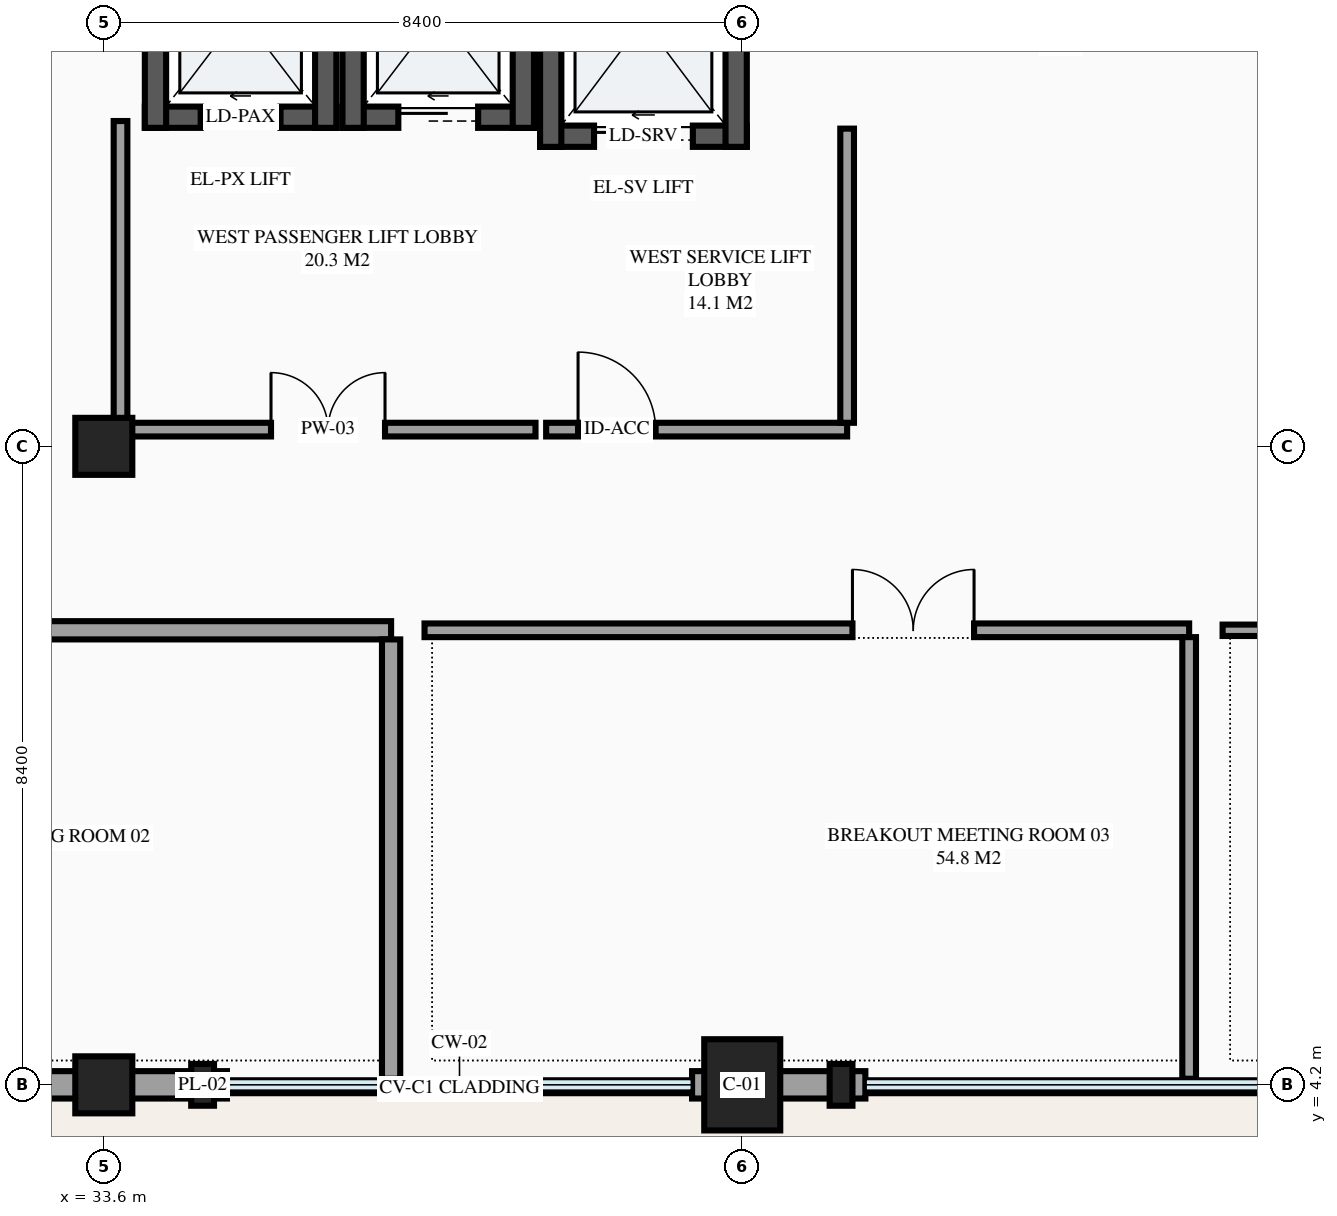
"""IFC4 building model, lengths in metres.
Left out: names, types, materials, properties, quantities, classifications, styles, units other than length and angle.
Written with IfcOpenShell. Run it as: python <this file> out.ifc"""

import sys

from ifc_helpers import new_model, si_unit, direction, frame, frame_2d, origin, origin_2d, place, context, subcontext, project, spatial, rectangle, extrude, element, fill, save


model = new_model("IFC4")
c1 = context("Model", 3, precision=1e-05, world=origin(), true_north=direction((0.0, 1.0)))
c2 = subcontext(c1, "Body", "Model", "MODEL_VIEW")
j1 = project(units=[si_unit("LENGTHUNIT", "METRE"), si_unit("PLANEANGLEUNIT", "RADIAN")], contexts=[c1])
p1 = place(None, origin())
s1 = spatial("IfcSite", under=j1, at=p1, CompositionType="ELEMENT")
p2 = place(p1, origin())
s2 = spatial("IfcBuilding", under=s1, at=p2, CompositionType="ELEMENT")
p3 = place(p2, frame((0.0, 0.0, 5.4)))
s3 = spatial("IfcBuildingStorey", under=s2, at=p3, CompositionType="ELEMENT", Elevation=5.4)
for number, where, z_axis, x_axis in (
    (1, (33.6, 4.2, 0.0), (0.0, 0.0, 1.0), (1.0, 0.0, 0.0)),
    (2, (33.6, 12.6, 0.0), (0.0, 0.0, 1.0), (1.0, 0.0, 0.0)),
):
    element("IfcColumn", number, at=place(p3, frame(where, z_axis=z_axis, x_axis=x_axis)), inside=s3, PredefinedType="COLUMN", context=c2, shape_type="SweptSolid", body=[
        extrude(rectangle(XDim=0.75, YDim=0.75, at=origin_2d()), origin(), (0.0, 0.0, 1.0), 4.5),
    ])
p4 = place(p3, frame((42.0, 4.2, 0.0), z_axis=(0.0, 0.0, 1.0), x_axis=(1.0, 0.0, 0.0)))
e3 = element("IfcColumn", 3, at=p4, inside=s3, PredefinedType="COLUMN", context=c2, shape_type="SweptSolid", body=[
    extrude(rectangle(XDim=1.0, YDim=1.2, at=origin_2d()), origin(), (0.0, 0.0, 1.0), 4.5),
])
for number, where, z_axis, x_axis in (
    (4, (34.9, 4.2, 0.0), (0.0, 0.0, 1.0), (1.0, 0.0, 0.0)),
    (5, (43.3, 4.2, 0.0), (0.0, 0.0, 1.0), (1.0, 0.0, 0.0)),
):
    element("IfcColumn", number, at=place(p3, frame(where, z_axis=z_axis, x_axis=x_axis)), inside=s3, PredefinedType="PILASTER", context=c2, shape_type="SweptSolid", body=[
        extrude(rectangle(XDim=0.3, YDim=0.55, at=origin_2d()), origin(), (0.0, 0.0, 1.0), 4.5),
    ])
p5 = place(p3, frame((25.2, 4.2, 0.0), z_axis=(0.0, 0.0, 1.0), x_axis=(1.0, 0.0, 0.0)))
e6 = element("IfcWall", 6, at=p5, inside=s3, PredefinedType="STANDARD", context=c2, shape_type="SweptSolid", body=[
    extrude(rectangle(XDim=8.4, YDim=0.36, at=frame_2d((4.2, 0.0))), origin(), (0.0, 0.0, 1.0), 3.39),
])
p6 = place(p5, frame((3.3, 0.0, 0.75)))
e7 = element("IfcOpeningElement", 7, at=p6, cuts=e6, PredefinedType="OPENING", context=c2, shape_type="SweptSolid", body=[
    extrude(rectangle(XDim=1.8, YDim=1.5, at=frame_2d((0.9, 0.75))), frame((0.0, 0.19, 0.0), z_axis=(0.0, -1.0, 0.0), x_axis=(1.0, 0.0, 0.0)), (0.0, 0.0, 1.0), 0.38),
])
p7 = place(p3, frame((33.6, 4.2, 0.0), z_axis=(0.0, 0.0, 1.0), x_axis=(1.0, 0.0, 0.0)))
e8 = element("IfcWall", 8, at=p7, inside=s3, PredefinedType="STANDARD", context=c2, shape_type="SweptSolid", body=[
    extrude(rectangle(XDim=1.62, YDim=0.36, at=frame_2d((0.81, 0.0))), origin(), (0.0, 0.0, 1.0), 3.74),
])
p8 = place(p3, frame((41.34, 4.2, 0.0), z_axis=(0.0, 0.0, 1.0), x_axis=(1.0, 0.0, 0.0)))
e9 = element("IfcWall", 9, at=p8, inside=s3, PredefinedType="STANDARD", context=c2, shape_type="SweptSolid", body=[
    extrude(rectangle(XDim=0.66, YDim=0.36, at=frame_2d((0.33, 0.0))), origin(), (0.0, 0.0, 1.0), 4.5),
])
p9 = place(p3, frame((42.0, 4.2, 0.0), z_axis=(0.0, 0.0, 1.0), x_axis=(1.0, 0.0, 0.0)))
e10 = element("IfcWall", 10, at=p9, inside=s3, PredefinedType="STANDARD", context=c2, shape_type="SweptSolid", body=[
    extrude(rectangle(XDim=1.62, YDim=0.36, at=frame_2d((0.81, 0.0))), origin(), (0.0, 0.0, 1.0), 3.637),
])
p10 = place(p3, frame((34.14, 16.93, 0.0), z_axis=(0.0, 0.0, 1.0), x_axis=(1.0, 0.0, 0.0)))
e11 = element("IfcWall", 11, at=p10, inside=s3, PredefinedType="SHEAR", context=c2, shape_type="SweptSolid", body=[
    extrude(rectangle(XDim=2.52, YDim=0.28, at=frame_2d((1.26, 0.0))), origin(), (0.0, 0.0, 1.0), 4.5),
])
p11 = place(p10, frame((0.735, 0.0, 0.0)))
e12 = element("IfcOpeningElement", 12, at=p11, cuts=e11, PredefinedType="OPENING", context=c2, shape_type="SweptSolid", body=[
    extrude(rectangle(XDim=1.05, YDim=2.2, at=frame_2d((0.525, 1.1))), frame((0.0, 0.15, 0.0), z_axis=(0.0, -1.0, 0.0), x_axis=(1.0, 0.0, 0.0)), (0.0, 0.0, 1.0), 0.3),
])
for number, where, z_axis, x_axis in (
    (13, (36.52, 16.79, 0.0), (0.0, 0.0, 1.0), (0.0, 1.0, 0.0)),
    (14, (34.28, 19.81, 0.0), (0.0, 0.0, 1.0), (0.0, -1.0, 0.0)),
):
    element("IfcWall", number, at=place(p3, frame(where, z_axis=z_axis, x_axis=x_axis)), inside=s3, PredefinedType="SHEAR", context=c2, shape_type="SweptSolid", body=[
        extrude(rectangle(XDim=3.02, YDim=0.28, at=frame_2d((1.51, 0.0))), origin(), (0.0, 0.0, 1.0), 4.5),
    ])
p12 = place(p3, frame((36.74, 16.93, 0.0), z_axis=(0.0, 0.0, 1.0), x_axis=(1.0, 0.0, 0.0)))
e15 = element("IfcWall", 15, at=p12, inside=s3, PredefinedType="SHEAR", context=c2, shape_type="SweptSolid", body=[
    extrude(rectangle(XDim=2.52, YDim=0.28, at=frame_2d((1.26, 0.0))), origin(), (0.0, 0.0, 1.0), 4.5),
])
p13 = place(p12, frame((0.735, 0.0, 0.0)))
e16 = element("IfcOpeningElement", 16, at=p13, cuts=e15, PredefinedType="OPENING", context=c2, shape_type="SweptSolid", body=[
    extrude(rectangle(XDim=1.05, YDim=2.2, at=frame_2d((0.525, 1.1))), frame((0.0, 0.15, 0.0), z_axis=(0.0, -1.0, 0.0), x_axis=(1.0, 0.0, 0.0)), (0.0, 0.0, 1.0), 0.3),
])
for number, where, z_axis, x_axis in (
    (17, (39.12, 16.79, 0.0), (0.0, 0.0, 1.0), (0.0, 1.0, 0.0)),
    (18, (36.88, 19.81, 0.0), (0.0, 0.0, 1.0), (0.0, -1.0, 0.0)),
):
    element("IfcWall", number, at=place(p3, frame(where, z_axis=z_axis, x_axis=x_axis)), inside=s3, PredefinedType="SHEAR", context=c2, shape_type="SweptSolid", body=[
        extrude(rectangle(XDim=3.02, YDim=0.28, at=frame_2d((1.51, 0.0))), origin(), (0.0, 0.0, 1.0), 4.5),
    ])
p14 = place(p3, frame((39.34, 16.68, 0.0), z_axis=(0.0, 0.0, 1.0), x_axis=(1.0, 0.0, 0.0)))
e19 = element("IfcWall", 19, at=p14, inside=s3, PredefinedType="SHEAR", context=c2, shape_type="SweptSolid", body=[
    extrude(rectangle(XDim=2.72, YDim=0.28, at=frame_2d((1.36, 0.0))), origin(), (0.0, 0.0, 1.0), 4.5),
])
p15 = place(p14, frame((0.71, 0.0, 0.0)))
e20 = element("IfcOpeningElement", 20, at=p15, cuts=e19, PredefinedType="OPENING", context=c2, shape_type="SweptSolid", body=[
    extrude(rectangle(XDim=1.3, YDim=2.25, at=frame_2d((0.65, 1.125))), frame((0.0, 0.15, 0.0), z_axis=(0.0, -1.0, 0.0), x_axis=(1.0, 0.0, 0.0)), (0.0, 0.0, 1.0), 0.3),
])
for number, where, z_axis, x_axis in (
    (21, (41.92, 16.54, 0.0), (0.0, 0.0, 1.0), (0.0, 1.0, 0.0)),
    (22, (39.48, 19.86, 0.0), (0.0, 0.0, 1.0), (0.0, -1.0, 0.0)),
):
    element("IfcWall", number, at=place(p3, frame(where, z_axis=z_axis, x_axis=x_axis)), inside=s3, PredefinedType="SHEAR", context=c2, shape_type="SweptSolid", body=[
        extrude(rectangle(XDim=3.32, YDim=0.28, at=frame_2d((1.66, 0.0))), origin(), (0.0, 0.0, 1.0), 4.5),
    ])
p16 = place(p3, frame((33.82, 12.82, 0.0), z_axis=(0.0, 0.0, 1.0), x_axis=(1.0, 0.0, 0.0)))
e23 = element("IfcWall", 23, at=p16, inside=s3, PredefinedType="PARTITIONING", context=c2, shape_type="SweptSolid", body=[
    extrude(rectangle(XDim=5.46, YDim=0.18, at=frame_2d((2.73, 0.0))), origin(), (0.0, 0.0, 1.0), 4.235),
])
p17 = place(p16, frame((1.98, 0.0, 0.0)))
e24 = element("IfcOpeningElement", 24, at=p17, cuts=e23, PredefinedType="OPENING", context=c2, shape_type="SweptSolid", body=[
    extrude(rectangle(XDim=1.5, YDim=2.15, at=frame_2d((0.75, 1.075))), frame((0.0, 0.1, 0.0), z_axis=(0.0, -1.0, 0.0), x_axis=(1.0, 0.0, 0.0)), (0.0, 0.0, 1.0), 0.2),
])
p18 = place(p3, frame((33.82, 12.91, 0.0), z_axis=(0.0, 0.0, 1.0), x_axis=(0.0, 1.0, 0.0)))
e25 = element("IfcWall", 25, at=p18, inside=s3, PredefinedType="PARTITIONING", context=c2, shape_type="SweptSolid", body=[
    extrude(rectangle(XDim=3.97, YDim=0.18, at=frame_2d((1.985, 0.0))), origin(), (0.0, 0.0, 1.0), 3.29),
])
p19 = place(p3, frame((39.42, 12.82, 0.0), z_axis=(0.0, 0.0, 1.0), x_axis=(1.0, 0.0, 0.0)))
e26 = element("IfcWall", 26, at=p19, inside=s3, PredefinedType="PARTITIONING", context=c2, shape_type="SweptSolid", body=[
    extrude(rectangle(XDim=3.96, YDim=0.18, at=frame_2d((1.98, 0.0))), origin(), (0.0, 0.0, 1.0), 4.235),
])
p20 = place(p19, frame((0.42, 0.0, 0.0)))
e27 = element("IfcOpeningElement", 27, at=p20, cuts=e26, PredefinedType="OPENING", context=c2, shape_type="SweptSolid", body=[
    extrude(rectangle(XDim=1.02, YDim=2.15, at=frame_2d((0.51, 1.075))), frame((0.0, 0.1, 0.0), z_axis=(0.0, -1.0, 0.0), x_axis=(1.0, 0.0, 0.0)), (0.0, 0.0, 1.0), 0.2),
])
p21 = place(p3, frame((43.38, 12.91, 0.0), z_axis=(0.0, 0.0, 1.0), x_axis=(0.0, 1.0, 0.0)))
e28 = element("IfcWall", 28, at=p21, inside=s3, PredefinedType="PARTITIONING", context=c2, shape_type="SweptSolid", body=[
    extrude(rectangle(XDim=3.87, YDim=0.18, at=frame_2d((1.935, 0.0))), origin(), (0.0, 0.0, 1.0), 4.235),
])
p22 = place(p3, frame((27.32, 10.18, 0.0), z_axis=(0.0, 0.0, 1.0), x_axis=(1.0, 0.0, 0.0)))
e29 = element("IfcWall", 29, at=p22, inside=s3, PredefinedType="PARTITIONING", context=c2, shape_type="SweptSolid", body=[
    extrude(rectangle(XDim=10.06, YDim=0.24, at=frame_2d((5.03, 0.0))), origin(), (0.0, 0.0, 1.0), 4.235),
])
p23 = place(p22, frame((3.18, 0.0, 0.0)))
e30 = element("IfcOpeningElement", 30, at=p23, cuts=e29, PredefinedType="OPENING", context=c2, shape_type="SweptSolid", body=[
    extrude(rectangle(XDim=1.6, YDim=2.25, at=frame_2d((0.8, 1.125))), frame((0.0, 0.13, 0.0), z_axis=(0.0, -1.0, 0.0), x_axis=(1.0, 0.0, 0.0)), (0.0, 0.0, 1.0), 0.26),
])
p24 = place(p3, frame((37.38, 4.28, 0.0), z_axis=(0.0, 0.0, 1.0), x_axis=(0.0, 1.0, 0.0)))
e31 = element("IfcWall", 31, at=p24, inside=s3, PredefinedType="PARTITIONING", context=c2, shape_type="SweptSolid", body=[
    extrude(rectangle(XDim=5.78, YDim=0.24, at=frame_2d((2.89, 0.0))), origin(), (0.0, 0.0, 1.0), 4.235),
])
p25 = place(p3, frame((37.82, 10.18, 0.0), z_axis=(0.0, 0.0, 1.0), x_axis=(1.0, 0.0, 0.0)))
e32 = element("IfcWall", 32, at=p25, inside=s3, PredefinedType="PARTITIONING", context=c2, shape_type="SweptSolid", body=[
    extrude(rectangle(XDim=10.06, YDim=0.18, at=frame_2d((5.03, 0.0))), origin(), (0.0, 0.0, 1.0), 4.235),
])
p26 = place(p25, frame((5.63, 0.0, 0.0)))
e33 = element("IfcOpeningElement", 33, at=p26, cuts=e32, PredefinedType="OPENING", context=c2, shape_type="SweptSolid", body=[
    extrude(rectangle(XDim=1.6, YDim=2.25, at=frame_2d((0.8, 1.125))), frame((0.0, 0.1, 0.0), z_axis=(0.0, -1.0, 0.0), x_axis=(1.0, 0.0, 0.0)), (0.0, 0.0, 1.0), 0.2),
])
p27 = place(p3, frame((47.88, 4.28, 0.0), z_axis=(0.0, 0.0, 1.0), x_axis=(0.0, 1.0, 0.0)))
e34 = element("IfcWall", 34, at=p27, inside=s3, PredefinedType="PARTITIONING", context=c2, shape_type="SweptSolid", body=[
    extrude(rectangle(XDim=5.81, YDim=0.18, at=frame_2d((2.905, 0.0))), origin(), (0.0, 0.0, 1.0), 4.235),
])
p28 = place(p3, frame((48.32, 10.18, 0.0), z_axis=(0.0, 0.0, 1.0), x_axis=(1.0, 0.0, 0.0)))
e35 = element("IfcWall", 35, at=p28, inside=s3, PredefinedType="PARTITIONING", context=c2, shape_type="SweptSolid", body=[
    extrude(rectangle(XDim=10.06, YDim=0.15, at=frame_2d((5.03, 0.0))), origin(), (0.0, 0.0, 1.0), 4.235),
])
p29 = place(p28, frame((4.23, 0.0, 0.0)))
e36 = element("IfcOpeningElement", 36, at=p29, cuts=e35, PredefinedType="OPENING", context=c2, shape_type="SweptSolid", body=[
    extrude(rectangle(XDim=1.6, YDim=2.25, at=frame_2d((0.8, 1.125))), frame((0.0, 0.085, 0.0), z_axis=(0.0, -1.0, 0.0), x_axis=(1.0, 0.0, 0.0)), (0.0, 0.0, 1.0), 0.17),
])
p30 = place(p11, origin())
e37 = element("IfcDoor", 37, at=p30, inside=s3, OperationType="SLIDING_TO_LEFT", PredefinedType="DOOR", context=c2, shape_type="SweptSolid", body=[
    extrude(rectangle(XDim=1.05, YDim=2.2, at=frame_2d((0.525, 1.1))), frame((0.0, 0.025, 0.0), z_axis=(0.0, -1.0, 0.0), x_axis=(1.0, 0.0, 0.0)), (0.0, 0.0, 1.0), 0.05),
])
fill(e12, e37)
p31 = place(p13, origin())
e38 = element("IfcDoor", 38, at=p31, inside=s3, OperationType="SLIDING_TO_LEFT", PredefinedType="DOOR", context=c2, shape_type="SweptSolid", body=[
    extrude(rectangle(XDim=1.05, YDim=2.2, at=frame_2d((0.525, 1.1))), frame((0.0, 0.025, 0.0), z_axis=(0.0, -1.0, 0.0), x_axis=(1.0, 0.0, 0.0)), (0.0, 0.0, 1.0), 0.05),
])
fill(e16, e38)
p32 = place(p15, origin())
e39 = element("IfcDoor", 39, at=p32, inside=s3, OperationType="SLIDING_TO_LEFT", PredefinedType="DOOR", context=c2, shape_type="SweptSolid", body=[
    extrude(rectangle(XDim=1.3, YDim=2.25, at=frame_2d((0.65, 1.125))), frame((0.0, 0.025, 0.0), z_axis=(0.0, -1.0, 0.0), x_axis=(1.0, 0.0, 0.0)), (0.0, 0.0, 1.0), 0.05),
])
fill(e20, e39)
p33 = place(p17, origin())
e40 = element("IfcDoor", 40, at=p33, inside=s3, OperationType="DOUBLE_DOOR_SINGLE_SWING", PredefinedType="DOOR", context=c2, shape_type="SweptSolid", body=[
    extrude(rectangle(XDim=1.5, YDim=2.15, at=frame_2d((0.75, 1.075))), frame((0.0, 0.025, 0.0), z_axis=(0.0, -1.0, 0.0), x_axis=(1.0, 0.0, 0.0)), (0.0, 0.0, 1.0), 0.05),
])
fill(e24, e40)
p34 = place(p20, origin())
e41 = element("IfcDoor", 41, at=p34, inside=s3, OperationType="SINGLE_SWING_LEFT", PredefinedType="DOOR", context=c2, shape_type="SweptSolid", body=[
    extrude(rectangle(XDim=1.02, YDim=2.15, at=frame_2d((0.51, 1.075))), frame((0.0, 0.025, 0.0), z_axis=(0.0, -1.0, 0.0), x_axis=(1.0, 0.0, 0.0)), (0.0, 0.0, 1.0), 0.05),
])
fill(e27, e41)
p35 = place(p26, origin())
e42 = element("IfcDoor", 42, at=p35, inside=s3, OperationType="DOUBLE_DOOR_SINGLE_SWING", PredefinedType="DOOR", context=c2, shape_type="SweptSolid", body=[
    extrude(rectangle(XDim=1.6, YDim=2.25, at=frame_2d((0.8, 1.125))), frame((0.0, 0.025, 0.0), z_axis=(0.0, -1.0, 0.0), x_axis=(1.0, 0.0, 0.0)), (0.0, 0.0, 1.0), 0.05),
])
fill(e33, e42)
save(model, sys.argv[1])
